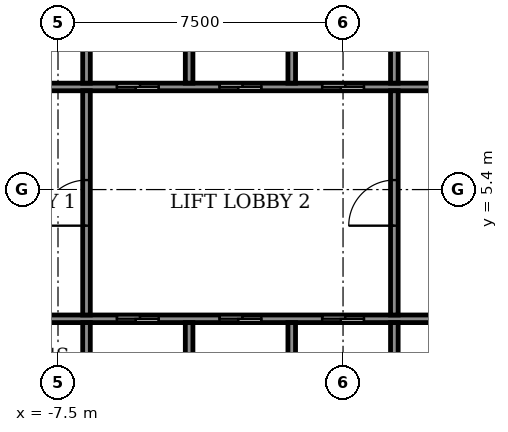
"""IFC4 building model, lengths in metres.
Left out: names, types, materials, properties, quantities, classifications, styles, units other than length and angle.
Written with IfcOpenShell. Run it as: python <this file> out.ifc"""

import sys

from ifc_helpers import new_model, si_unit, direction, frame, frame_2d, origin, place, context, subcontext, project, spatial, rectangle, extrude, element, fill, save


model = new_model("IFC4")
c1 = context("Model", 3, precision=1e-05, world=origin(), true_north=direction((0.0, 1.0)))
c2 = subcontext(c1, "Body", "Model", "MODEL_VIEW")
j1 = project(units=[si_unit("LENGTHUNIT", "METRE"), si_unit("PLANEANGLEUNIT", "RADIAN")], contexts=[c1])
p1 = place(None, origin())
s1 = spatial("IfcSite", under=j1, at=p1, CompositionType="ELEMENT")
p2 = place(p1, origin())
s2 = spatial("IfcBuilding", under=s1, at=p2, CompositionType="ELEMENT")
p3 = place(p2, frame((0.0, 0.0, 306.1)))
s3 = spatial("IfcBuildingStorey", under=s2, at=p3, CompositionType="ELEMENT", Elevation=306.1)
p4 = place(p3, frame((-10.9, 2.0, 0.0), z_axis=(0.0, 0.0, 1.0), x_axis=(1.0, 0.0, 0.0)))
e1 = element("IfcWall", 1, at=p4, inside=s3, PredefinedType="SHEAR", context=c2, shape_type="SweptSolid", body=[
    extrude(rectangle(XDim=21.8, YDim=0.2, at=frame_2d((10.9, 0.0))), origin(), (0.0, 0.0, 1.0), 3.05),
])
p5 = place(p4, frame((4.95, 0.0, 0.0)))
e2 = element("IfcOpeningElement", 2, at=p5, cuts=e1, PredefinedType="OPENING", context=c2, shape_type="SweptSolid", body=[
    extrude(rectangle(XDim=1.1, YDim=2.1, at=frame_2d((0.55, 1.05))), frame((0.0, 0.11, 0.0), z_axis=(0.0, -1.0, 0.0), x_axis=(1.0, 0.0, 0.0)), (0.0, 0.0, 1.0), 0.22),
])
p6 = place(p4, frame((7.65, 0.0, 0.0)))
e3 = element("IfcOpeningElement", 3, at=p6, cuts=e1, PredefinedType="OPENING", context=c2, shape_type="SweptSolid", body=[
    extrude(rectangle(XDim=1.1, YDim=2.1, at=frame_2d((0.55, 1.05))), frame((0.0, 0.11, 0.0), z_axis=(0.0, -1.0, 0.0), x_axis=(1.0, 0.0, 0.0)), (0.0, 0.0, 1.0), 0.22),
])
p7 = place(p4, frame((10.35, 0.0, 0.0)))
e4 = element("IfcOpeningElement", 4, at=p7, cuts=e1, PredefinedType="OPENING", context=c2, shape_type="SweptSolid", body=[
    extrude(rectangle(XDim=1.1, YDim=2.1, at=frame_2d((0.55, 1.05))), frame((0.0, 0.11, 0.0), z_axis=(0.0, -1.0, 0.0), x_axis=(1.0, 0.0, 0.0)), (0.0, 0.0, 1.0), 0.22),
])
p8 = place(p4, frame((1.675, 0.0, 0.0)))
e5 = element("IfcOpeningElement", 5, at=p8, cuts=e1, PredefinedType="OPENING", context=c2, shape_type="SweptSolid", body=[
    extrude(rectangle(XDim=0.9, YDim=2.1, at=frame_2d((0.45, 1.05))), frame((0.0, 0.11, 0.0), z_axis=(0.0, -1.0, 0.0), x_axis=(1.0, 0.0, 0.0)), (0.0, 0.0, 1.0), 0.22),
])
p9 = place(p4, frame((14.5, 0.0, 0.0)))
e6 = element("IfcOpeningElement", 6, at=p9, cuts=e1, PredefinedType="OPENING", context=c2, shape_type="SweptSolid", body=[
    extrude(rectangle(XDim=0.9, YDim=2.1, at=frame_2d((0.45, 1.05))), frame((0.0, 0.11, 0.0), z_axis=(0.0, -1.0, 0.0), x_axis=(1.0, 0.0, 0.0)), (0.0, 0.0, 1.0), 0.22),
])
p10 = place(p4, frame((19.225, 0.0, 0.0)))
e7 = element("IfcOpeningElement", 7, at=p10, cuts=e1, PredefinedType="OPENING", context=c2, shape_type="SweptSolid", body=[
    extrude(rectangle(XDim=0.9, YDim=2.1, at=frame_2d((0.45, 1.05))), frame((0.0, 0.11, 0.0), z_axis=(0.0, -1.0, 0.0), x_axis=(1.0, 0.0, 0.0)), (0.0, 0.0, 1.0), 0.22),
])
p11 = place(p3, frame((-10.9, 8.1, 0.0), z_axis=(0.0, 0.0, 1.0), x_axis=(1.0, 0.0, 0.0)))
e8 = element("IfcWall", 8, at=p11, inside=s3, PredefinedType="SHEAR", context=c2, shape_type="SweptSolid", body=[
    extrude(rectangle(XDim=21.8, YDim=0.2, at=frame_2d((10.9, 0.0))), origin(), (0.0, 0.0, 1.0), 3.05),
])
p12 = place(p11, frame((4.95, 0.0, 0.0)))
e9 = element("IfcOpeningElement", 9, at=p12, cuts=e8, PredefinedType="OPENING", context=c2, shape_type="SweptSolid", body=[
    extrude(rectangle(XDim=1.1, YDim=2.1, at=frame_2d((0.55, 1.05))), frame((0.0, 0.11, 0.0), z_axis=(0.0, -1.0, 0.0), x_axis=(1.0, 0.0, 0.0)), (0.0, 0.0, 1.0), 0.22),
])
p13 = place(p11, frame((7.65, 0.0, 0.0)))
e10 = element("IfcOpeningElement", 10, at=p13, cuts=e8, PredefinedType="OPENING", context=c2, shape_type="SweptSolid", body=[
    extrude(rectangle(XDim=1.1, YDim=2.1, at=frame_2d((0.55, 1.05))), frame((0.0, 0.11, 0.0), z_axis=(0.0, -1.0, 0.0), x_axis=(1.0, 0.0, 0.0)), (0.0, 0.0, 1.0), 0.22),
])
p14 = place(p11, frame((10.35, 0.0, 0.0)))
e11 = element("IfcOpeningElement", 11, at=p14, cuts=e8, PredefinedType="OPENING", context=c2, shape_type="SweptSolid", body=[
    extrude(rectangle(XDim=1.1, YDim=2.1, at=frame_2d((0.55, 1.05))), frame((0.0, 0.11, 0.0), z_axis=(0.0, -1.0, 0.0), x_axis=(1.0, 0.0, 0.0)), (0.0, 0.0, 1.0), 0.22),
])
p15 = place(p11, frame((1.675, 0.0, 0.0)))
e12 = element("IfcOpeningElement", 12, at=p15, cuts=e8, PredefinedType="OPENING", context=c2, shape_type="SweptSolid", body=[
    extrude(rectangle(XDim=0.9, YDim=2.1, at=frame_2d((0.45, 1.05))), frame((0.0, 0.11, 0.0), z_axis=(0.0, -1.0, 0.0), x_axis=(1.0, 0.0, 0.0)), (0.0, 0.0, 1.0), 0.22),
])
p16 = place(p11, frame((14.5, 0.0, 0.0)))
e13 = element("IfcOpeningElement", 13, at=p16, cuts=e8, PredefinedType="OPENING", context=c2, shape_type="SweptSolid", body=[
    extrude(rectangle(XDim=0.9, YDim=2.1, at=frame_2d((0.45, 1.05))), frame((0.0, 0.11, 0.0), z_axis=(0.0, -1.0, 0.0), x_axis=(1.0, 0.0, 0.0)), (0.0, 0.0, 1.0), 0.22),
])
p17 = place(p11, frame((19.225, 0.0, 0.0)))
e14 = element("IfcOpeningElement", 14, at=p17, cuts=e8, PredefinedType="OPENING", context=c2, shape_type="SweptSolid", body=[
    extrude(rectangle(XDim=0.9, YDim=2.1, at=frame_2d((0.45, 1.05))), frame((0.0, 0.11, 0.0), z_axis=(0.0, -1.0, 0.0), x_axis=(1.0, 0.0, 0.0)), (0.0, 0.0, 1.0), 0.22),
])
for number, where, z_axis, x_axis in (
    (15, (-6.75, -0.6, 0.0), (0.0, 0.0, 1.0), (0.0, 1.0, 0.0)),
    (16, (-4.05, -0.6, 0.0), (0.0, 0.0, 1.0), (0.0, 1.0, 0.0)),
    (17, (-1.35, -0.6, 0.0), (0.0, 0.0, 1.0), (0.0, 1.0, 0.0)),
    (18, (1.35, -0.6, 0.0), (0.0, 0.0, 1.0), (0.0, 1.0, 0.0)),
):
    element("IfcWall", number, at=place(p3, frame(where, z_axis=z_axis, x_axis=x_axis)), inside=s3, PredefinedType="SHEAR", context=c2, shape_type="SweptSolid", body=[
        extrude(rectangle(XDim=2.5, YDim=0.2, at=frame_2d((1.25, 0.0))), origin(), (0.0, 0.0, 1.0), 3.05),
    ])
for number, where, z_axis, x_axis in (
    (19, (-6.75, 8.2, 0.0), (0.0, 0.0, 1.0), (0.0, 1.0, 0.0)),
    (20, (-4.05, 8.2, 0.0), (0.0, 0.0, 1.0), (0.0, 1.0, 0.0)),
    (21, (-1.35, 8.2, 0.0), (0.0, 0.0, 1.0), (0.0, 1.0, 0.0)),
    (22, (1.35, 8.2, 0.0), (0.0, 0.0, 1.0), (0.0, 1.0, 0.0)),
):
    element("IfcWall", number, at=place(p3, frame(where, z_axis=z_axis, x_axis=x_axis)), inside=s3, PredefinedType="SHEAR", context=c2, shape_type="SweptSolid", body=[
        extrude(rectangle(XDim=2.6, YDim=0.2, at=frame_2d((1.3, 0.0))), origin(), (0.0, 0.0, 1.0), 3.05),
    ])
p18 = place(p3, frame((-6.75, 2.1, 0.0), z_axis=(0.0, 0.0, 1.0), x_axis=(0.0, 1.0, 0.0)))
e23 = element("IfcWall", 23, at=p18, inside=s3, PredefinedType="STANDARD", context=c2, shape_type="SweptSolid", body=[
    extrude(rectangle(XDim=5.9, YDim=0.2, at=frame_2d((2.95, 0.0))), origin(), (0.0, 0.0, 1.0), 3.05),
])
p19 = place(p18, frame((2.35, 0.0, 0.0)))
e24 = element("IfcOpeningElement", 24, at=p19, cuts=e23, PredefinedType="OPENING", context=c2, shape_type="SweptSolid", body=[
    extrude(rectangle(XDim=1.2, YDim=2.1, at=frame_2d((0.6, 1.05))), frame((0.0, 0.11, 0.0), z_axis=(0.0, -1.0, 0.0), x_axis=(1.0, 0.0, 0.0)), (0.0, 0.0, 1.0), 0.22),
])
p20 = place(p3, frame((1.35, 2.1, 0.0), z_axis=(0.0, 0.0, 1.0), x_axis=(0.0, 1.0, 0.0)))
e25 = element("IfcWall", 25, at=p20, inside=s3, PredefinedType="STANDARD", context=c2, shape_type="SweptSolid", body=[
    extrude(rectangle(XDim=5.9, YDim=0.2, at=frame_2d((2.95, 0.0))), origin(), (0.0, 0.0, 1.0), 3.05),
])
p21 = place(p20, frame((2.35, 0.0, 0.0)))
e26 = element("IfcOpeningElement", 26, at=p21, cuts=e25, PredefinedType="OPENING", context=c2, shape_type="SweptSolid", body=[
    extrude(rectangle(XDim=1.2, YDim=2.1, at=frame_2d((0.6, 1.05))), frame((0.0, 0.11, 0.0), z_axis=(0.0, -1.0, 0.0), x_axis=(1.0, 0.0, 0.0)), (0.0, 0.0, 1.0), 0.22),
])
p22 = place(p5, origin())
e27 = element("IfcDoor", 27, at=p22, inside=s3, OperationType="SLIDING_TO_LEFT", PredefinedType="DOOR", context=c2, shape_type="SweptSolid", body=[
    extrude(rectangle(XDim=1.1, YDim=2.1, at=frame_2d((0.55, 1.05))), frame((0.0, 0.025, 0.0), z_axis=(0.0, -1.0, 0.0), x_axis=(1.0, 0.0, 0.0)), (0.0, 0.0, 1.0), 0.05),
])
fill(e2, e27)
p23 = place(p6, origin())
e28 = element("IfcDoor", 28, at=p23, inside=s3, OperationType="SLIDING_TO_LEFT", PredefinedType="DOOR", context=c2, shape_type="SweptSolid", body=[
    extrude(rectangle(XDim=1.1, YDim=2.1, at=frame_2d((0.55, 1.05))), frame((0.0, 0.025, 0.0), z_axis=(0.0, -1.0, 0.0), x_axis=(1.0, 0.0, 0.0)), (0.0, 0.0, 1.0), 0.05),
])
fill(e3, e28)
p24 = place(p7, origin())
e29 = element("IfcDoor", 29, at=p24, inside=s3, OperationType="SLIDING_TO_LEFT", PredefinedType="DOOR", context=c2, shape_type="SweptSolid", body=[
    extrude(rectangle(XDim=1.1, YDim=2.1, at=frame_2d((0.55, 1.05))), frame((0.0, 0.025, 0.0), z_axis=(0.0, -1.0, 0.0), x_axis=(1.0, 0.0, 0.0)), (0.0, 0.0, 1.0), 0.05),
])
fill(e4, e29)
p25 = place(p12, origin())
e30 = element("IfcDoor", 30, at=p25, inside=s3, OperationType="SLIDING_TO_LEFT", PredefinedType="DOOR", context=c2, shape_type="SweptSolid", body=[
    extrude(rectangle(XDim=1.1, YDim=2.1, at=frame_2d((0.55, 1.05))), frame((0.0, 0.025, 0.0), z_axis=(0.0, -1.0, 0.0), x_axis=(1.0, 0.0, 0.0)), (0.0, 0.0, 1.0), 0.05),
])
fill(e9, e30)
p26 = place(p13, origin())
e31 = element("IfcDoor", 31, at=p26, inside=s3, OperationType="SLIDING_TO_LEFT", PredefinedType="DOOR", context=c2, shape_type="SweptSolid", body=[
    extrude(rectangle(XDim=1.1, YDim=2.1, at=frame_2d((0.55, 1.05))), frame((0.0, 0.025, 0.0), z_axis=(0.0, -1.0, 0.0), x_axis=(1.0, 0.0, 0.0)), (0.0, 0.0, 1.0), 0.05),
])
fill(e10, e31)
p27 = place(p14, origin())
e32 = element("IfcDoor", 32, at=p27, inside=s3, OperationType="SLIDING_TO_LEFT", PredefinedType="DOOR", context=c2, shape_type="SweptSolid", body=[
    extrude(rectangle(XDim=1.1, YDim=2.1, at=frame_2d((0.55, 1.05))), frame((0.0, 0.025, 0.0), z_axis=(0.0, -1.0, 0.0), x_axis=(1.0, 0.0, 0.0)), (0.0, 0.0, 1.0), 0.05),
])
fill(e11, e32)
p28 = place(p19, origin())
e33 = element("IfcDoor", 33, at=p28, inside=s3, OperationType="SINGLE_SWING_LEFT", PredefinedType="DOOR", context=c2, shape_type="SweptSolid", body=[
    extrude(rectangle(XDim=1.2, YDim=2.1, at=frame_2d((0.6, 1.05))), frame((0.0, 0.025, 0.0), z_axis=(0.0, -1.0, 0.0), x_axis=(1.0, 0.0, 0.0)), (0.0, 0.0, 1.0), 0.05),
])
fill(e24, e33)
p29 = place(p21, origin())
e34 = element("IfcDoor", 34, at=p29, inside=s3, OperationType="SINGLE_SWING_LEFT", PredefinedType="DOOR", context=c2, shape_type="SweptSolid", body=[
    extrude(rectangle(XDim=1.2, YDim=2.1, at=frame_2d((0.6, 1.05))), frame((0.0, 0.025, 0.0), z_axis=(0.0, -1.0, 0.0), x_axis=(1.0, 0.0, 0.0)), (0.0, 0.0, 1.0), 0.05),
])
fill(e26, e34)
save(model, sys.argv[1])
